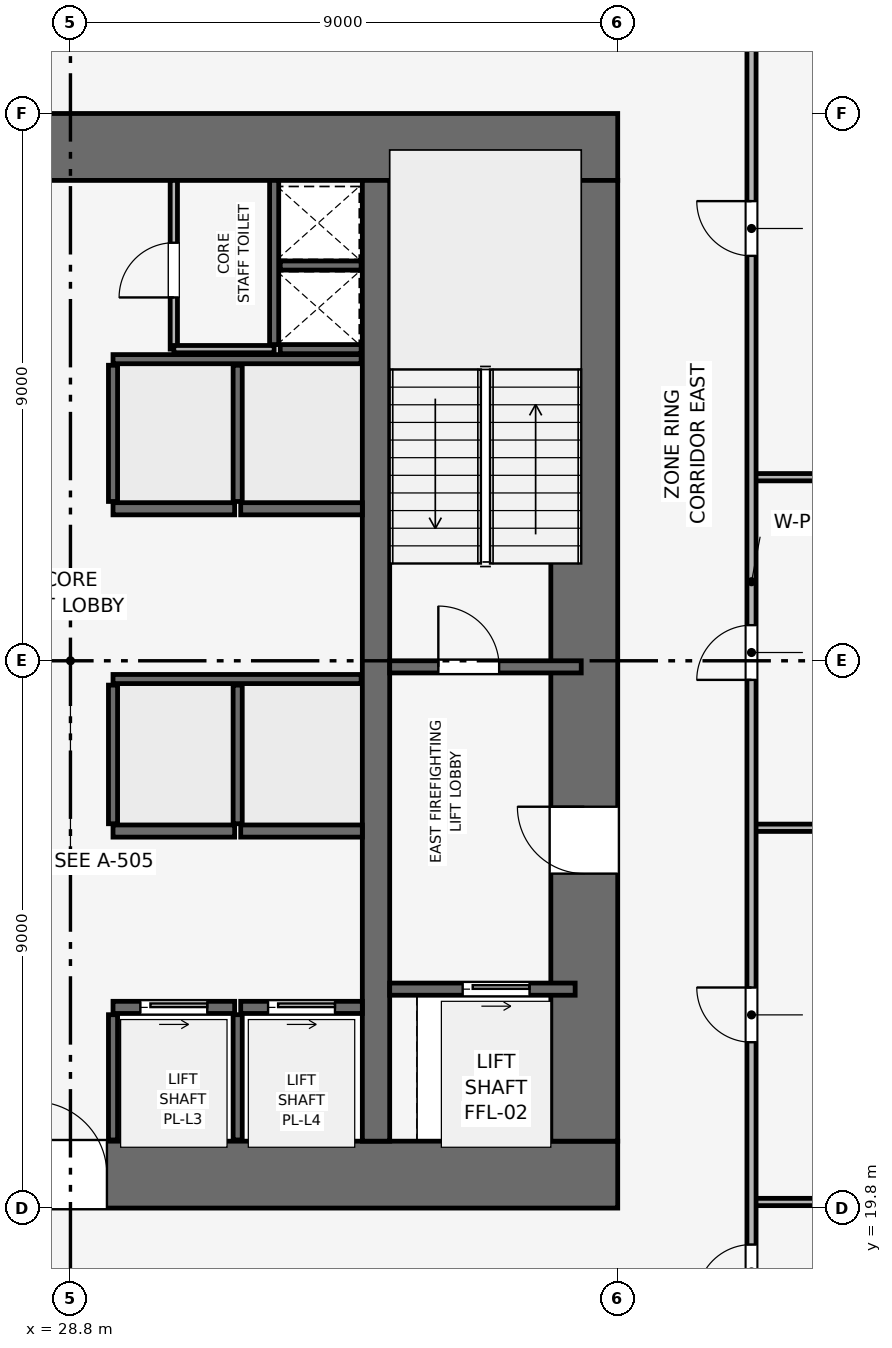
"""IFC4 building model, lengths in metres.
Left out: names, types, materials, properties, quantities, classifications, styles, units other than length and angle.
Written with IfcOpenShell. Run it as: python <this file> out.ifc"""

import sys

from ifc_helpers import new_model, si_unit, direction, frame, frame_2d, origin, place, context, subcontext, project, spatial, rectangle, extrude, element, fill, save


model = new_model("IFC4")
c1 = context("Model", 3, precision=1e-05, world=origin(), true_north=direction((0.0, 1.0)))
c2 = subcontext(c1, "Body", "Model", "MODEL_VIEW")
j1 = project(units=[si_unit("LENGTHUNIT", "METRE"), si_unit("PLANEANGLEUNIT", "RADIAN")], contexts=[c1])
p1 = place(None, origin())
s1 = spatial("IfcSite", under=j1, at=p1, CompositionType="ELEMENT")
p2 = place(p1, origin())
s2 = spatial("IfcBuilding", under=s1, at=p2, CompositionType="ELEMENT")
p3 = place(p2, frame((0.0, 0.0, 76.8)))
s3 = spatial("IfcBuildingStorey", under=s2, at=p3, CompositionType="ELEMENT", Elevation=76.8)
p4 = place(p3, frame((19.8, 20.35, 0.0), z_axis=(0.0, 0.0, 1.0), x_axis=(1.0, 0.0, 0.0)))
e1 = element("IfcWall", 1, at=p4, inside=s3, PredefinedType="SHEAR", context=c2, shape_type="SweptSolid", body=[
    extrude(rectangle(XDim=18.0, YDim=1.1, at=frame_2d((9.0, 0.0))), origin(), (0.0, 0.0, 1.0), 3.9),
])
p5 = place(p4, frame((8.4, 0.0, 0.0)))
e2 = element("IfcOpeningElement", 2, at=p5, cuts=e1, PredefinedType="OPENING", context=c2, shape_type="SweptSolid", body=[
    extrude(rectangle(XDim=1.2, YDim=2.2, at=frame_2d((0.6, 1.1))), frame((0.0, 0.56, 0.0), z_axis=(0.0, -1.0, 0.0), x_axis=(1.0, 0.0, 0.0)), (0.0, 0.0, 1.0), 1.12),
])
p6 = place(p3, frame((19.8, 37.25, 0.0), z_axis=(0.0, 0.0, 1.0), x_axis=(1.0, 0.0, 0.0)))
e3 = element("IfcWall", 3, at=p6, inside=s3, PredefinedType="SHEAR", context=c2, shape_type="SweptSolid", body=[
    extrude(rectangle(XDim=18.0, YDim=1.1, at=frame_2d((9.0, 0.0))), origin(), (0.0, 0.0, 1.0), 3.9),
])
p7 = place(p6, frame((7.05, 0.0, 0.0)))
e4 = element("IfcOpeningElement", 4, at=p7, cuts=e3, PredefinedType="OPENING", context=c2, shape_type="SweptSolid", body=[
    extrude(rectangle(XDim=1.1, YDim=2.15, at=frame_2d((0.55, 1.075))), frame((0.0, 0.56, 0.0), z_axis=(0.0, -1.0, 0.0), x_axis=(1.0, 0.0, 0.0)), (0.0, 0.0, 1.0), 1.12),
])
p8 = place(p3, frame((37.25, 20.9, 0.0), z_axis=(0.0, 0.0, 1.0), x_axis=(0.0, 1.0, 0.0)))
e5 = element("IfcWall", 5, at=p8, inside=s3, PredefinedType="SHEAR", context=c2, shape_type="SweptSolid", body=[
    extrude(rectangle(XDim=15.8, YDim=1.1, at=frame_2d((7.9, 0.0))), origin(), (0.0, 0.0, 1.0), 3.9),
])
p9 = place(p8, frame((4.4, 0.0, 0.0)))
e6 = element("IfcOpeningElement", 6, at=p9, cuts=e5, PredefinedType="OPENING", context=c2, shape_type="SweptSolid", body=[
    extrude(rectangle(XDim=1.1, YDim=2.15, at=frame_2d((0.55, 1.075))), frame((0.0, 0.56, 0.0), z_axis=(0.0, -1.0, 0.0), x_axis=(1.0, 0.0, 0.0)), (0.0, 0.0, 1.0), 1.12),
])
p10 = place(p3, frame((33.825, 20.9, 0.0), z_axis=(0.0, 0.0, 1.0), x_axis=(0.0, 1.0, 0.0)))
e7 = element("IfcWall", 7, at=p10, inside=s3, PredefinedType="SHEAR", context=c2, shape_type="SweptSolid", body=[
    extrude(rectangle(XDim=15.8, YDim=0.45, at=frame_2d((7.9, 0.0))), origin(), (0.0, 0.0, 1.0), 3.9),
])
p11 = place(p3, frame((34.05, 28.7, 0.0), z_axis=(0.0, 0.0, 1.0), x_axis=(1.0, 0.0, 0.0)))
e8 = element("IfcWall", 8, at=p11, inside=s3, PredefinedType="SHEAR", context=c2, shape_type="SweptSolid", body=[
    extrude(rectangle(XDim=3.15, YDim=0.2, at=frame_2d((1.575, 0.0))), origin(), (0.0, 0.0, 1.0), 3.65),
])
p12 = place(p11, frame((0.8, 0.0, 0.0)))
e9 = element("IfcOpeningElement", 9, at=p12, cuts=e8, PredefinedType="OPENING", context=c2, shape_type="SweptSolid", body=[
    extrude(rectangle(XDim=1.0, YDim=2.1, at=frame_2d((0.5, 1.05))), frame((0.0, 0.11, 0.0), z_axis=(0.0, -1.0, 0.0), x_axis=(1.0, 0.0, 0.0)), (0.0, 0.0, 1.0), 0.22),
])
p13 = place(p3, frame((32.15, 34.0, 0.0), z_axis=(0.0, 0.0, 1.0), x_axis=(0.0, 1.0, 0.0)))
e10 = element("IfcWall", 10, at=p13, inside=s3, PredefinedType="SHEAR", context=c2, shape_type="SweptSolid", body=[
    extrude(rectangle(XDim=2.7, YDim=0.15, at=frame_2d((1.35, 0.0))), origin(), (0.0, 0.0, 1.0), 3.65),
])
for number, where, z_axis, x_axis in (
    (11, (32.25, 33.925, 0.0), (0.0, 0.0, 1.0), (1.0, 0.0, 0.0)),
    (12, (32.25, 35.3, 0.0), (0.0, 0.0, 1.0), (1.0, 0.0, 0.0)),
):
    element("IfcWall", number, at=place(p3, frame(where, z_axis=z_axis, x_axis=x_axis)), inside=s3, PredefinedType="SHEAR", context=c2, shape_type="SweptSolid", body=[
        extrude(rectangle(XDim=1.33, YDim=0.15, at=frame_2d((0.665, 0.0))), origin(), (0.0, 0.0, 1.0), 3.65),
    ])
p14 = place(p3, frame((34.05, 23.4, 0.0), z_axis=(0.0, 0.0, 1.0), x_axis=(1.0, 0.0, 0.0)))
e13 = element("IfcWall", 13, at=p14, inside=s3, PredefinedType="SHEAR", context=c2, shape_type="SweptSolid", body=[
    extrude(rectangle(XDim=3.05, YDim=0.2, at=frame_2d((1.525, 0.0))), origin(), (0.0, 0.0, 1.0), 3.65),
])
p15 = place(p14, frame((1.2, 0.0, 0.0)))
e14 = element("IfcOpeningElement", 14, at=p15, cuts=e13, PredefinedType="OPENING", context=c2, shape_type="SweptSolid", body=[
    extrude(rectangle(XDim=1.1, YDim=2.15, at=frame_2d((0.55, 1.075))), frame((0.0, 0.11, 0.0), z_axis=(0.0, -1.0, 0.0), x_axis=(1.0, 0.0, 0.0)), (0.0, 0.0, 1.0), 0.22),
])
p16 = place(p3, frame((29.5, 23.1, 0.0), z_axis=(0.0, 0.0, 1.0), x_axis=(1.0, 0.0, 0.0)))
e15 = element("IfcWall", 15, at=p16, inside=s3, PredefinedType="SHEAR", context=c2, shape_type="SweptSolid", body=[
    extrude(rectangle(XDim=2.0, YDim=0.2, at=frame_2d((1.0, 0.0))), origin(), (0.0, 0.0, 1.0), 3.65),
])
p17 = place(p16, frame((0.45, 0.0, 0.0)))
e16 = element("IfcOpeningElement", 16, at=p17, cuts=e15, PredefinedType="OPENING", context=c2, shape_type="SweptSolid", body=[
    extrude(rectangle(XDim=1.1, YDim=2.15, at=frame_2d((0.55, 1.075))), frame((0.0, 0.11, 0.0), z_axis=(0.0, -1.0, 0.0), x_axis=(1.0, 0.0, 0.0)), (0.0, 0.0, 1.0), 0.22),
])
p18 = place(p3, frame((31.6, 23.1, 0.0), z_axis=(0.0, 0.0, 1.0), x_axis=(1.0, 0.0, 0.0)))
e17 = element("IfcWall", 17, at=p18, inside=s3, PredefinedType="SHEAR", context=c2, shape_type="SweptSolid", body=[
    extrude(rectangle(XDim=2.0, YDim=0.2, at=frame_2d((1.0, 0.0))), origin(), (0.0, 0.0, 1.0), 3.65),
])
p19 = place(p18, frame((0.45, 0.0, 0.0)))
e18 = element("IfcOpeningElement", 18, at=p19, cuts=e17, PredefinedType="OPENING", context=c2, shape_type="SweptSolid", body=[
    extrude(rectangle(XDim=1.1, YDim=2.15, at=frame_2d((0.55, 1.075))), frame((0.0, 0.11, 0.0), z_axis=(0.0, -1.0, 0.0), x_axis=(1.0, 0.0, 0.0)), (0.0, 0.0, 1.0), 0.22),
])
for number, where, z_axis, x_axis in (
    (19, (29.5, 26.0, 0.0), (0.0, 0.0, 1.0), (1.0, 0.0, 0.0)),
    (20, (31.6, 26.0, 0.0), (0.0, 0.0, 1.0), (1.0, 0.0, 0.0)),
    (21, (29.5, 31.3, 0.0), (0.0, 0.0, 1.0), (1.0, 0.0, 0.0)),
    (22, (31.6, 31.3, 0.0), (0.0, 0.0, 1.0), (1.0, 0.0, 0.0)),
):
    element("IfcWall", number, at=place(p3, frame(where, z_axis=z_axis, x_axis=x_axis)), inside=s3, PredefinedType="SHEAR", context=c2, shape_type="SweptSolid", body=[
        extrude(rectangle(XDim=2.0, YDim=0.2, at=frame_2d((1.0, 0.0))), origin(), (0.0, 0.0, 1.0), 3.65),
    ])
for number, where, z_axis, x_axis in (
    (23, (29.5, 20.92, 0.0), (0.0, 0.0, 1.0), (0.0, 1.0, 0.0)),
    (24, (31.55, 20.92, 0.0), (0.0, 0.0, 1.0), (0.0, 1.0, 0.0)),
):
    element("IfcWall", number, at=place(p3, frame(where, z_axis=z_axis, x_axis=x_axis)), inside=s3, PredefinedType="SHEAR", context=c2, shape_type="SweptSolid", body=[
        extrude(rectangle(XDim=2.06, YDim=0.15, at=frame_2d((1.03, 0.0))), origin(), (0.0, 0.0, 1.0), 3.65),
    ])
p20 = place(p3, frame((29.5, 28.5, 0.0), z_axis=(0.0, 0.0, 1.0), x_axis=(1.0, 0.0, 0.0)))
e25 = element("IfcWall", 25, at=p20, inside=s3, PredefinedType="SHEAR", context=c2, shape_type="SweptSolid", body=[
    extrude(rectangle(XDim=4.08, YDim=0.15, at=frame_2d((2.04, 0.0))), origin(), (0.0, 0.0, 1.0), 3.65),
])
for number, where, z_axis, x_axis in (
    (26, (29.5, 26.12, 0.0), (0.0, 0.0, 1.0), (0.0, 1.0, 0.0)),
    (27, (31.55, 26.12, 0.0), (0.0, 0.0, 1.0), (0.0, 1.0, 0.0)),
):
    element("IfcWall", number, at=place(p3, frame(where, z_axis=z_axis, x_axis=x_axis)), inside=s3, PredefinedType="SHEAR", context=c2, shape_type="SweptSolid", body=[
        extrude(rectangle(XDim=2.28, YDim=0.15, at=frame_2d((1.14, 0.0))), origin(), (0.0, 0.0, 1.0), 3.65),
    ])
p21 = place(p3, frame((29.5, 33.76, 0.0), z_axis=(0.0, 0.0, 1.0), x_axis=(1.0, 0.0, 0.0)))
e28 = element("IfcWall", 28, at=p21, inside=s3, PredefinedType="SHEAR", context=c2, shape_type="SweptSolid", body=[
    extrude(rectangle(XDim=4.08, YDim=0.15, at=frame_2d((2.04, 0.0))), origin(), (0.0, 0.0, 1.0), 3.65),
])
for number, where, z_axis, x_axis in (
    (29, (29.5, 31.42, 0.0), (0.0, 0.0, 1.0), (0.0, 1.0, 0.0)),
    (30, (31.55, 31.42, 0.0), (0.0, 0.0, 1.0), (0.0, 1.0, 0.0)),
):
    element("IfcWall", number, at=place(p3, frame(where, z_axis=z_axis, x_axis=x_axis)), inside=s3, PredefinedType="SHEAR", context=c2, shape_type="SweptSolid", body=[
        extrude(rectangle(XDim=2.24, YDim=0.15, at=frame_2d((1.12, 0.0))), origin(), (0.0, 0.0, 1.0), 3.65),
    ])
p22 = place(p3, frame((30.5, 33.925, 0.0), z_axis=(0.0, 0.0, 1.0), x_axis=(0.0, 1.0, 0.0)))
e31 = element("IfcWall", 31, at=p22, inside=s3, PredefinedType="PARTITIONING", context=c2, shape_type="SweptSolid", body=[
    extrude(rectangle(XDim=2.775, YDim=0.12, at=frame_2d((1.387, 0.0))), origin(), (0.0, 0.0, 1.0), 3.65),
])
p23 = place(p22, frame((0.85, 0.0, 0.0)))
e32 = element("IfcOpeningElement", 32, at=p23, cuts=e31, PredefinedType="OPENING", context=c2, shape_type="SweptSolid", body=[
    extrude(rectangle(XDim=0.9, YDim=2.1, at=frame_2d((0.45, 1.05))), frame((0.0, 0.07, 0.0), z_axis=(0.0, -1.0, 0.0), x_axis=(1.0, 0.0, 0.0)), (0.0, 0.0, 1.0), 0.14),
])
p24 = place(p3, frame((30.5, 33.925, 0.0), z_axis=(0.0, 0.0, 1.0), x_axis=(1.0, 0.0, 0.0)))
e33 = element("IfcWall", 33, at=p24, inside=s3, PredefinedType="PARTITIONING", context=c2, shape_type="SweptSolid", body=[
    extrude(rectangle(XDim=1.65, YDim=0.12, at=frame_2d((0.825, 0.0))), origin(), (0.0, 0.0, 1.0), 3.65),
])
for number, where, z_axis, x_axis in (
    (34, (40.0, 19.9, 0.0), (0.0, 0.0, 1.0), (1.0, 0.0, 0.0)),
    (35, (40.0, 26.054, 0.0), (0.0, 0.0, 1.0), (1.0, 0.0, 0.0)),
    (36, (40.0, 31.819, 0.0), (0.0, 0.0, 1.0), (1.0, 0.0, 0.0)),
):
    element("IfcWall", number, at=place(p3, frame(where, z_axis=z_axis, x_axis=x_axis)), inside=s3, PredefinedType="PARTITIONING", context=c2, shape_type="SweptSolid", body=[
        extrude(rectangle(XDim=16.57, YDim=0.12, at=frame_2d((8.285, 0.0))), origin(), (0.0, 0.0, 1.0), 2.935),
    ])
p25 = place(p3, frame((40.0, 17.6, 0.0), z_axis=(0.0, 0.0, 1.0), x_axis=(0.0, 1.0, 0.0)))
e37 = element("IfcWall", 37, at=p25, inside=s3, PredefinedType="PARTITIONING", context=c2, shape_type="SweptSolid", body=[
    extrude(rectangle(XDim=22.4, YDim=0.15, at=frame_2d((11.2, 0.0))), origin(), (0.0, 0.0, 1.0), 3.085),
])
p26 = place(p25, frame((0.7, 0.0, 0.0)))
e38 = element("IfcOpeningElement", 38, at=p26, cuts=e37, PredefinedType="OPENING", context=c2, shape_type="SweptSolid", body=[
    extrude(rectangle(XDim=0.9, YDim=2.1, at=frame_2d((0.45, 1.05))), frame((0.0, 0.085, 0.0), z_axis=(0.0, -1.0, 0.0), x_axis=(1.0, 0.0, 0.0)), (0.0, 0.0, 1.0), 0.17),
])
p27 = place(p25, frame((4.927, 0.0, 0.0)))
e39 = element("IfcOpeningElement", 39, at=p27, cuts=e37, PredefinedType="OPENING", context=c2, shape_type="SweptSolid", body=[
    extrude(rectangle(XDim=0.9, YDim=2.1, at=frame_2d((0.45, 1.05))), frame((0.0, 0.085, 0.0), z_axis=(0.0, -1.0, 0.0), x_axis=(1.0, 0.0, 0.0)), (0.0, 0.0, 1.0), 0.17),
])
p28 = place(p25, frame((10.886, 0.0, 0.0)))
e40 = element("IfcOpeningElement", 40, at=p28, cuts=e37, PredefinedType="OPENING", context=c2, shape_type="SweptSolid", body=[
    extrude(rectangle(XDim=0.9, YDim=2.1, at=frame_2d((0.45, 1.05))), frame((0.0, 0.085, 0.0), z_axis=(0.0, -1.0, 0.0), x_axis=(1.0, 0.0, 0.0)), (0.0, 0.0, 1.0), 0.17),
])
p29 = place(p25, frame((17.859, 0.0, 0.0)))
e41 = element("IfcOpeningElement", 41, at=p29, cuts=e37, PredefinedType="OPENING", context=c2, shape_type="SweptSolid", body=[
    extrude(rectangle(XDim=0.9, YDim=2.1, at=frame_2d((0.45, 1.05))), frame((0.0, 0.085, 0.0), z_axis=(0.0, -1.0, 0.0), x_axis=(1.0, 0.0, 0.0)), (0.0, 0.0, 1.0), 0.17),
])
p30 = place(p12, origin())
e42 = element("IfcDoor", 42, at=p30, inside=s3, OperationType="SINGLE_SWING_LEFT", PredefinedType="DOOR", context=c2, shape_type="SweptSolid", body=[
    extrude(rectangle(XDim=1.0, YDim=2.1, at=frame_2d((0.5, 1.05))), frame((0.0, 0.025, 0.0), z_axis=(0.0, -1.0, 0.0), x_axis=(1.0, 0.0, 0.0)), (0.0, 0.0, 1.0), 0.05),
])
fill(e9, e42)
p31 = place(p15, origin())
e43 = element("IfcDoor", 43, at=p31, inside=s3, OperationType="SLIDING_TO_RIGHT", PredefinedType="DOOR", context=c2, shape_type="SweptSolid", body=[
    extrude(rectangle(XDim=1.1, YDim=2.15, at=frame_2d((0.55, 1.075))), frame((0.0, 0.025, 0.0), z_axis=(0.0, -1.0, 0.0), x_axis=(1.0, 0.0, 0.0)), (0.0, 0.0, 1.0), 0.05),
])
fill(e14, e43)
p32 = place(p17, origin())
e44 = element("IfcDoor", 44, at=p32, inside=s3, OperationType="SLIDING_TO_RIGHT", PredefinedType="DOOR", context=c2, shape_type="SweptSolid", body=[
    extrude(rectangle(XDim=1.1, YDim=2.15, at=frame_2d((0.55, 1.075))), frame((0.0, 0.025, 0.0), z_axis=(0.0, -1.0, 0.0), x_axis=(1.0, 0.0, 0.0)), (0.0, 0.0, 1.0), 0.05),
])
fill(e16, e44)
p33 = place(p19, origin())
e45 = element("IfcDoor", 45, at=p33, inside=s3, OperationType="SLIDING_TO_RIGHT", PredefinedType="DOOR", context=c2, shape_type="SweptSolid", body=[
    extrude(rectangle(XDim=1.1, YDim=2.15, at=frame_2d((0.55, 1.075))), frame((0.0, 0.025, 0.0), z_axis=(0.0, -1.0, 0.0), x_axis=(1.0, 0.0, 0.0)), (0.0, 0.0, 1.0), 0.05),
])
fill(e18, e45)
p34 = place(p23, origin())
e46 = element("IfcDoor", 46, at=p34, inside=s3, OperationType="SINGLE_SWING_LEFT", PredefinedType="DOOR", context=c2, shape_type="SweptSolid", body=[
    extrude(rectangle(XDim=0.9, YDim=2.1, at=frame_2d((0.45, 1.05))), frame((0.0, 0.025, 0.0), z_axis=(0.0, -1.0, 0.0), x_axis=(1.0, 0.0, 0.0)), (0.0, 0.0, 1.0), 0.05),
])
fill(e32, e46)
p35 = place(p26, origin())
e47 = element("IfcDoor", 47, at=p35, inside=s3, OperationType="SINGLE_SWING_LEFT", PredefinedType="DOOR", context=c2, shape_type="SweptSolid", body=[
    extrude(rectangle(XDim=0.9, YDim=2.1, at=frame_2d((0.45, 1.05))), frame((0.0, 0.025, 0.0), z_axis=(0.0, -1.0, 0.0), x_axis=(1.0, 0.0, 0.0)), (0.0, 0.0, 1.0), 0.05),
])
fill(e38, e47)
p36 = place(p27, origin())
e48 = element("IfcDoor", 48, at=p36, inside=s3, OperationType="SINGLE_SWING_RIGHT", PredefinedType="DOOR", context=c2, shape_type="SweptSolid", body=[
    extrude(rectangle(XDim=0.9, YDim=2.1, at=frame_2d((0.45, 1.05))), frame((0.0, 0.025, 0.0), z_axis=(0.0, -1.0, 0.0), x_axis=(1.0, 0.0, 0.0)), (0.0, 0.0, 1.0), 0.05),
])
fill(e39, e48)
p37 = place(p28, origin())
e49 = element("IfcDoor", 49, at=p37, inside=s3, OperationType="SINGLE_SWING_LEFT", PredefinedType="DOOR", context=c2, shape_type="SweptSolid", body=[
    extrude(rectangle(XDim=0.9, YDim=2.1, at=frame_2d((0.45, 1.05))), frame((0.0, 0.025, 0.0), z_axis=(0.0, -1.0, 0.0), x_axis=(1.0, 0.0, 0.0)), (0.0, 0.0, 1.0), 0.05),
])
fill(e40, e49)
p38 = place(p29, origin())
e50 = element("IfcDoor", 50, at=p38, inside=s3, OperationType="SINGLE_SWING_RIGHT", PredefinedType="DOOR", context=c2, shape_type="SweptSolid", body=[
    extrude(rectangle(XDim=0.9, YDim=2.1, at=frame_2d((0.45, 1.05))), frame((0.0, 0.025, 0.0), z_axis=(0.0, -1.0, 0.0), x_axis=(1.0, 0.0, 0.0)), (0.0, 0.0, 1.0), 0.05),
])
fill(e41, e50)
p39 = place(p9, origin())
e51 = element("IfcDoor", 51, at=p39, inside=s3, OperationType="SINGLE_SWING_RIGHT", PredefinedType="DOOR", context=c2, shape_type="SweptSolid", body=[
    extrude(rectangle(XDim=1.1, YDim=2.15, at=frame_2d((0.55, 1.075))), frame((0.0, 0.025, 0.0), z_axis=(0.0, -1.0, 0.0), x_axis=(1.0, 0.0, 0.0)), (0.0, 0.0, 1.0), 0.05),
])
fill(e6, e51)
p40 = place(p5, origin())
e52 = element("IfcDoor", 52, at=p40, inside=s3, OperationType="SINGLE_SWING_LEFT", PredefinedType="DOOR", context=c2, shape_type="SweptSolid", body=[
    extrude(rectangle(XDim=1.2, YDim=2.2, at=frame_2d((0.6, 1.1))), frame((0.0, 0.025, 0.0), z_axis=(0.0, -1.0, 0.0), x_axis=(1.0, 0.0, 0.0)), (0.0, 0.0, 1.0), 0.05),
])
fill(e2, e52)
save(model, sys.argv[1])
